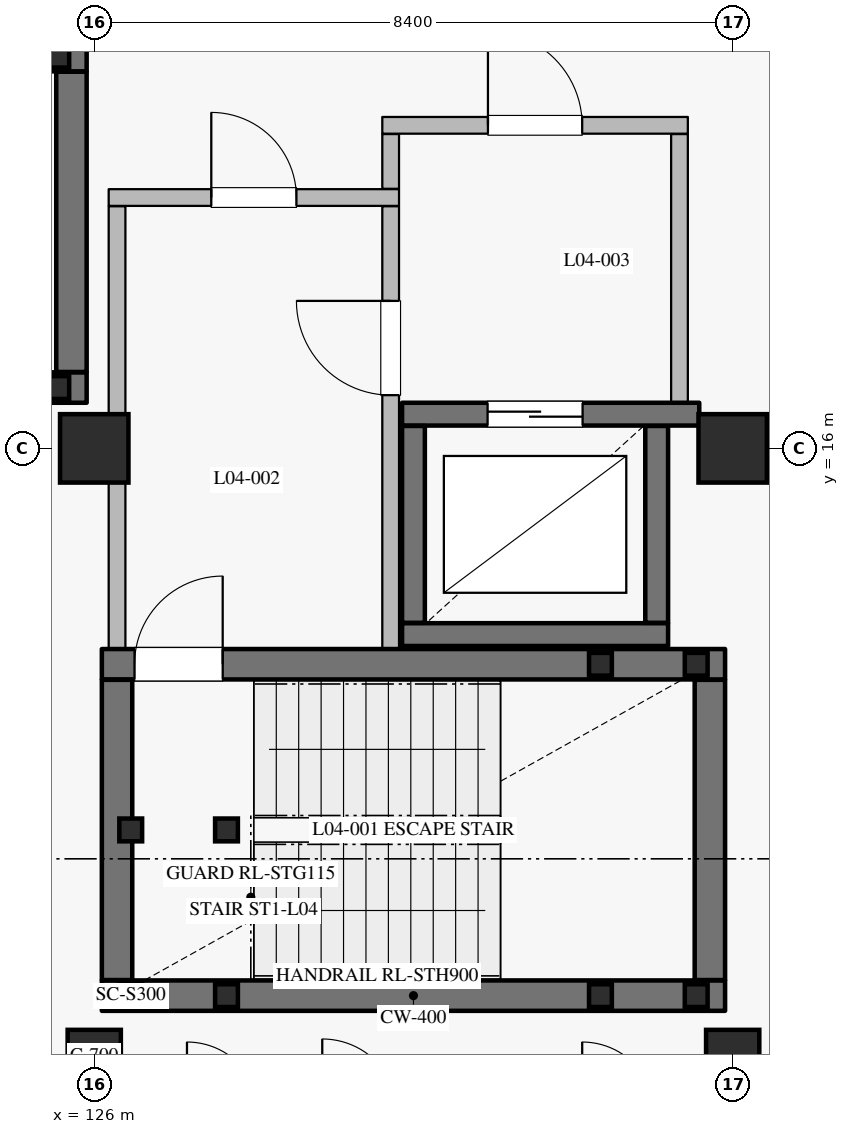
"""IFC4 building model, lengths in metres.
Left out: names, types, materials, properties, quantities, classifications, styles, units other than length and angle.
Written with IfcOpenShell. Run it as: python <this file> out.ifc"""

import sys

from ifc_helpers import new_model, si_unit, direction, frame, frame_2d, origin, origin_2d, place, context, subcontext, project, spatial, rectangle, hollow_rectangle, extrude, element, fill, save


model = new_model("IFC4")
c1 = context("Model", 3, precision=1e-05, world=origin(), true_north=direction((0.0, 1.0)))
c2 = subcontext(c1, "Body", "Model", "MODEL_VIEW")
j1 = project(units=[si_unit("LENGTHUNIT", "METRE"), si_unit("PLANEANGLEUNIT", "RADIAN")], contexts=[c1])
p1 = place(None, origin())
s1 = spatial("IfcSite", under=j1, at=p1, CompositionType="ELEMENT")
p2 = place(p1, origin())
s2 = spatial("IfcBuilding", under=s1, at=p2, CompositionType="ELEMENT")
p3 = place(p2, frame((0.0, 0.0, 21.0)))
s3 = spatial("IfcBuildingStorey", under=s2, at=p3, CompositionType="ELEMENT", Elevation=21.0)
for number, where, z_axis, x_axis in (
    (1, (126.0, 16.0, 0.0), (0.0, 0.0, 1.0), (1.0, 0.0, 0.0)),
    (2, (134.4, 16.0, 0.0), (0.0, 0.0, 1.0), (1.0, 0.0, 0.0)),
):
    element("IfcColumn", number, at=place(p3, frame(where, z_axis=z_axis, x_axis=x_axis)), inside=s3, PredefinedType="COLUMN", context=c2, shape_type="SweptSolid", body=[
        extrude(rectangle(XDim=0.9, YDim=0.9, at=origin_2d()), origin(), (0.0, 0.0, 1.0), 4.2),
    ])
for number, where, z_axis, x_axis in (
    (3, (126.0, 8.0, 0.0), (0.0, 0.0, 1.0), (1.0, 0.0, 0.0)),
    (4, (134.4, 8.0, 0.0), (0.0, 0.0, 1.0), (1.0, 0.0, 0.0)),
):
    element("IfcColumn", number, at=place(p3, frame(where, z_axis=z_axis, x_axis=x_axis)), inside=s3, PredefinedType="COLUMN", context=c2, shape_type="SweptSolid", body=[
        extrude(rectangle(XDim=0.7, YDim=0.7, at=origin_2d()), origin(), (0.0, 0.0, 1.0), 4.2),
    ])
p4 = place(p3, frame((130.05, 13.55, 0.0), z_axis=(0.0, 0.0, 1.0), x_axis=(1.0, 0.0, 0.0)))
e5 = element("IfcWall", 5, at=p4, inside=s3, PredefinedType="SHEAR", context=c2, shape_type="SweptSolid", body=[
    extrude(rectangle(XDim=3.5, YDim=0.3, at=frame_2d((1.75, 0.0))), origin(), (0.0, 0.0, 1.0), 3.965),
])
p5 = place(p3, frame((133.4, 13.705, 0.0), z_axis=(0.0, 0.0, 1.0), x_axis=(0.0, 1.0, 0.0)))
e6 = element("IfcWall", 6, at=p5, inside=s3, PredefinedType="SHEAR", context=c2, shape_type="SweptSolid", body=[
    extrude(rectangle(XDim=2.59, YDim=0.3, at=frame_2d((1.295, 0.0))), origin(), (0.0, 0.0, 1.0), 3.965),
])
p6 = place(p3, frame((133.96, 16.45, 0.0), z_axis=(0.0, 0.0, 1.0), x_axis=(-1.0, 0.0, 0.0)))
e7 = element("IfcWall", 7, at=p6, inside=s3, PredefinedType="SHEAR", context=c2, shape_type="SweptSolid", body=[
    extrude(rectangle(XDim=3.91, YDim=0.3, at=frame_2d((1.955, 0.0))), origin(), (0.0, 0.0, 1.0), 3.965),
])
p7 = place(p6, frame((1.535, 0.0, 0.0)))
e8 = element("IfcOpeningElement", 8, at=p7, cuts=e7, PredefinedType="OPENING", context=c2, shape_type="SweptSolid", body=[
    extrude(rectangle(XDim=1.25, YDim=2.25, at=frame_2d((0.625, 1.125))), frame((0.0, 0.16, 0.0), z_axis=(0.0, -1.0, 0.0), x_axis=(1.0, 0.0, 0.0)), (0.0, 0.0, 1.0), 0.32),
])
p8 = place(p3, frame((130.2, 16.295, 0.0), z_axis=(0.0, 0.0, 1.0), x_axis=(0.0, -1.0, 0.0)))
e9 = element("IfcWall", 9, at=p8, inside=s3, PredefinedType="SHEAR", context=c2, shape_type="SweptSolid", body=[
    extrude(rectangle(XDim=2.59, YDim=0.3, at=frame_2d((1.295, 0.0))), origin(), (0.0, 0.0, 1.0), 3.965),
])
p9 = place(p3, frame((126.1, 8.8, 0.0), z_axis=(0.0, 0.0, 1.0), x_axis=(1.0, 0.0, 0.0)))
e10 = element("IfcWall", 10, at=p9, inside=s3, PredefinedType="SHEAR", context=c2, shape_type="SweptSolid", body=[
    extrude(rectangle(XDim=8.2, YDim=0.4, at=frame_2d((4.1, 0.0))), origin(), (0.0, 0.0, 1.0), 3.965),
])
p10 = place(p3, frame((134.1, 9.005, 0.0), z_axis=(0.0, 0.0, 1.0), x_axis=(0.0, 1.0, 0.0)))
e11 = element("IfcWall", 11, at=p10, inside=s3, PredefinedType="SHEAR", context=c2, shape_type="SweptSolid", body=[
    extrude(rectangle(XDim=3.95, YDim=0.4, at=frame_2d((1.975, 0.0))), origin(), (0.0, 0.0, 1.0), 3.965),
])
p11 = place(p3, frame((126.1, 13.16, 0.0), z_axis=(0.0, 0.0, 1.0), x_axis=(1.0, 0.0, 0.0)))
e12 = element("IfcWall", 12, at=p11, inside=s3, PredefinedType="SHEAR", context=c2, shape_type="SweptSolid", body=[
    extrude(rectangle(XDim=8.2, YDim=0.4, at=frame_2d((4.1, 0.0))), origin(), (0.0, 0.0, 1.0), 3.965),
])
p12 = place(p11, frame((0.43, 0.0, 0.0)))
e13 = element("IfcOpeningElement", 13, at=p12, cuts=e12, PredefinedType="OPENING", context=c2, shape_type="SweptSolid", body=[
    extrude(rectangle(XDim=1.16, YDim=2.2, at=frame_2d((0.58, 1.1))), frame((0.0, 0.21, 0.0), z_axis=(0.0, -1.0, 0.0), x_axis=(1.0, 0.0, 0.0)), (0.0, 0.0, 1.0), 0.42),
])
p13 = place(p3, frame((126.3, 9.005, 0.0), z_axis=(0.0, 0.0, 1.0), x_axis=(0.0, 1.0, 0.0)))
e14 = element("IfcWall", 14, at=p13, inside=s3, PredefinedType="SHEAR", context=c2, shape_type="SweptSolid", body=[
    extrude(rectangle(XDim=3.95, YDim=0.4, at=frame_2d((1.975, 0.0))), origin(), (0.0, 0.0, 1.0), 3.965),
])
p14 = place(p3, frame((126.3, 13.365, 0.0), z_axis=(0.0, 0.0, 1.0), x_axis=(0.0, 1.0, 0.0)))
e15 = element("IfcWall", 15, at=p14, inside=s3, PredefinedType="PARTITIONING", context=c2, shape_type="SweptSolid", body=[
    extrude(rectangle(XDim=5.82, YDim=0.22, at=frame_2d((2.91, 0.0))), origin(), (0.0, 0.0, 1.0), 3.965),
])
p15 = place(p3, frame((126.19, 19.3, 0.0), z_axis=(0.0, 0.0, 1.0), x_axis=(1.0, 0.0, 0.0)))
e16 = element("IfcWall", 16, at=p15, inside=s3, PredefinedType="PARTITIONING", context=c2, shape_type="SweptSolid", body=[
    extrude(rectangle(XDim=3.82, YDim=0.22, at=frame_2d((1.91, 0.0))), origin(), (0.0, 0.0, 1.0), 3.965),
])
p16 = place(p15, frame((1.35, 0.0, 0.0)))
e17 = element("IfcOpeningElement", 17, at=p16, cuts=e16, PredefinedType="OPENING", context=c2, shape_type="SweptSolid", body=[
    extrude(rectangle(XDim=1.12, YDim=2.2, at=frame_2d((0.56, 1.1))), frame((0.0, 0.12, 0.0), z_axis=(0.0, -1.0, 0.0), x_axis=(1.0, 0.0, 0.0)), (0.0, 0.0, 1.0), 0.24),
])
p17 = place(p3, frame((129.9, 13.365, 0.0), z_axis=(0.0, 0.0, 1.0), x_axis=(0.0, 1.0, 0.0)))
e18 = element("IfcWall", 18, at=p17, inside=s3, PredefinedType="PARTITIONING", context=c2, shape_type="SweptSolid", body=[
    extrude(rectangle(XDim=5.82, YDim=0.22, at=frame_2d((2.91, 0.0))), origin(), (0.0, 0.0, 1.0), 3.965),
])
p18 = place(p17, frame((3.335, 0.0, 0.0)))
e19 = element("IfcOpeningElement", 19, at=p18, cuts=e18, PredefinedType="OPENING", context=c2, shape_type="SweptSolid", body=[
    extrude(rectangle(XDim=1.24, YDim=2.2, at=frame_2d((0.62, 1.1))), frame((0.0, 0.12, 0.0), z_axis=(0.0, -1.0, 0.0), x_axis=(1.0, 0.0, 0.0)), (0.0, 0.0, 1.0), 0.24),
])
p19 = place(p3, frame((129.9, 19.415, 0.0), z_axis=(0.0, 0.0, 1.0), x_axis=(0.0, 1.0, 0.0)))
e20 = element("IfcWall", 20, at=p19, inside=s3, PredefinedType="PARTITIONING", context=c2, shape_type="SweptSolid", body=[
    extrude(rectangle(XDim=0.72, YDim=0.22, at=frame_2d((0.36, 0.0))), origin(), (0.0, 0.0, 1.0), 3.965),
])
p20 = place(p3, frame((133.7, 16.605, 0.0), z_axis=(0.0, 0.0, 1.0), x_axis=(0.0, 1.0, 0.0)))
e21 = element("IfcWall", 21, at=p20, inside=s3, PredefinedType="PARTITIONING", context=c2, shape_type="SweptSolid", body=[
    extrude(rectangle(XDim=3.53, YDim=0.22, at=frame_2d((1.765, 0.0))), origin(), (0.0, 0.0, 1.0), 3.965),
])
p21 = place(p3, frame((129.79, 20.25, 0.0), z_axis=(0.0, 0.0, 1.0), x_axis=(1.0, 0.0, 0.0)))
e22 = element("IfcWall", 22, at=p21, inside=s3, PredefinedType="PARTITIONING", context=c2, shape_type="SweptSolid", body=[
    extrude(rectangle(XDim=4.02, YDim=0.22, at=frame_2d((2.01, 0.0))), origin(), (0.0, 0.0, 1.0), 3.965),
])
p22 = place(p21, frame((1.39, 0.0, 0.0)))
e23 = element("IfcOpeningElement", 23, at=p22, cuts=e22, PredefinedType="OPENING", context=c2, shape_type="SweptSolid", body=[
    extrude(rectangle(XDim=1.24, YDim=2.2, at=frame_2d((0.62, 1.1))), frame((0.0, 0.12, 0.0), z_axis=(0.0, -1.0, 0.0), x_axis=(1.0, 0.0, 0.0)), (0.0, 0.0, 1.0), 0.24),
])
for number, where, z_axis, x_axis in (
    (24, (126.48, 8.8, 0.0), (0.0, 0.0, 1.0), (1.0, 0.0, 0.0)),
    (25, (126.48, 10.98, 0.0), (0.0, 0.0, 1.0), (1.0, 0.0, 0.0)),
    (26, (127.74, 8.8, 0.0), (0.0, 0.0, 1.0), (1.0, 0.0, 0.0)),
    (27, (127.74, 10.98, 0.0), (0.0, 0.0, 1.0), (1.0, 0.0, 0.0)),
):
    element("IfcColumn", number, at=place(p3, frame(where, z_axis=z_axis, x_axis=x_axis)), inside=s3, PredefinedType="COLUMN", context=c2, shape_type="SweptSolid", body=[
        extrude(hollow_rectangle(XDim=0.3, YDim=0.3, WallThickness=0.012, at=origin_2d()), origin(), (0.0, 0.0, 1.0), 4.02),
    ])
for number, where, z_axis, x_axis in (
    (28, (132.66, 8.8, -2.4), (0.0, 0.0, 1.0), (1.0, 0.0, 0.0)),
    (29, (132.66, 13.16, -2.4), (0.0, 0.0, 1.0), (1.0, 0.0, 0.0)),
    (30, (133.92, 8.8, -2.4), (0.0, 0.0, 1.0), (1.0, 0.0, 0.0)),
    (31, (133.92, 13.16, -2.4), (0.0, 0.0, 1.0), (1.0, 0.0, 0.0)),
):
    element("IfcColumn", number, at=place(p3, frame(where, z_axis=z_axis, x_axis=x_axis)), inside=s3, PredefinedType="COLUMN", context=c2, shape_type="SweptSolid", body=[
        extrude(hollow_rectangle(XDim=0.3, YDim=0.3, WallThickness=0.012, at=origin_2d()), origin(), (0.0, 0.0, 1.0), 4.32),
    ])
p23 = place(p3, frame((117.75, 16.8, 0.0), z_axis=(0.0, 0.0, 1.0), x_axis=(1.0, 0.0, 0.0)))
e32 = element("IfcWall", 32, at=p23, inside=s3, PredefinedType="SHEAR", context=c2, shape_type="SweptSolid", body=[
    extrude(rectangle(XDim=8.15, YDim=0.4, at=frame_2d((4.075, 0.0))), origin(), (0.0, 0.0, 1.0), 3.965),
])
p24 = place(p3, frame((125.7, 17.005, 0.0), z_axis=(0.0, 0.0, 1.0), x_axis=(0.0, 1.0, 0.0)))
e33 = element("IfcWall", 33, at=p24, inside=s3, PredefinedType="SHEAR", context=c2, shape_type="SweptSolid", body=[
    extrude(rectangle(XDim=3.95, YDim=0.4, at=frame_2d((1.975, 0.0))), origin(), (0.0, 0.0, 1.0), 3.965),
])
p25 = place(p3, frame((117.75, 21.16, 0.0), z_axis=(0.0, 0.0, 1.0), x_axis=(1.0, 0.0, 0.0)))
e34 = element("IfcWall", 34, at=p25, inside=s3, PredefinedType="SHEAR", context=c2, shape_type="SweptSolid", body=[
    extrude(rectangle(XDim=8.15, YDim=0.4, at=frame_2d((4.075, 0.0))), origin(), (0.0, 0.0, 1.0), 3.965),
])
p26 = place(p25, frame((0.38, 0.0, 0.0)))
e35 = element("IfcOpeningElement", 35, at=p26, cuts=e34, PredefinedType="OPENING", context=c2, shape_type="SweptSolid", body=[
    extrude(rectangle(XDim=1.16, YDim=2.2, at=frame_2d((0.58, 1.1))), frame((0.0, 0.21, 0.0), z_axis=(0.0, -1.0, 0.0), x_axis=(1.0, 0.0, 0.0)), (0.0, 0.0, 1.0), 0.42),
])
for number, where, z_axis, x_axis in (
    (36, (125.52, 16.8, -2.4), (0.0, 0.0, 1.0), (1.0, 0.0, 0.0)),
    (37, (125.52, 21.16, -2.4), (0.0, 0.0, 1.0), (1.0, 0.0, 0.0)),
):
    element("IfcColumn", number, at=place(p3, frame(where, z_axis=z_axis, x_axis=x_axis)), inside=s3, PredefinedType="COLUMN", context=c2, shape_type="SweptSolid", body=[
        extrude(hollow_rectangle(XDim=0.3, YDim=0.3, WallThickness=0.012, at=origin_2d()), origin(), (0.0, 0.0, 1.0), 4.32),
    ])
p27 = place(p7, origin())
e38 = element("IfcDoor", 38, at=p27, inside=s3, OperationType="DOUBLE_DOOR_SLIDING", PredefinedType="DOOR", context=c2, shape_type="SweptSolid", body=[
    extrude(rectangle(XDim=1.25, YDim=2.25, at=frame_2d((0.625, 1.125))), frame((0.0, 0.025, 0.0), z_axis=(0.0, -1.0, 0.0), x_axis=(1.0, 0.0, 0.0)), (0.0, 0.0, 1.0), 0.05),
])
fill(e8, e38)
p28 = place(p12, origin())
e39 = element("IfcDoor", 39, at=p28, inside=s3, OperationType="SINGLE_SWING_RIGHT", PredefinedType="DOOR", context=c2, shape_type="SweptSolid", body=[
    extrude(rectangle(XDim=1.16, YDim=2.2, at=frame_2d((0.58, 1.1))), frame((0.0, 0.025, 0.0), z_axis=(0.0, -1.0, 0.0), x_axis=(1.0, 0.0, 0.0)), (0.0, 0.0, 1.0), 0.05),
])
fill(e13, e39)
p29 = place(p16, origin())
e40 = element("IfcDoor", 40, at=p29, inside=s3, OperationType="SINGLE_SWING_LEFT", PredefinedType="DOOR", context=c2, shape_type="SweptSolid", body=[
    extrude(rectangle(XDim=1.12, YDim=2.2, at=frame_2d((0.56, 1.1))), frame((0.0, 0.025, 0.0), z_axis=(0.0, -1.0, 0.0), x_axis=(1.0, 0.0, 0.0)), (0.0, 0.0, 1.0), 0.05),
])
fill(e17, e40)
p30 = place(p18, origin())
e41 = element("IfcDoor", 41, at=p30, inside=s3, OperationType="SINGLE_SWING_RIGHT", PredefinedType="DOOR", context=c2, shape_type="SweptSolid", body=[
    extrude(rectangle(XDim=1.24, YDim=2.2, at=frame_2d((0.62, 1.1))), frame((0.0, 0.025, 0.0), z_axis=(0.0, -1.0, 0.0), x_axis=(1.0, 0.0, 0.0)), (0.0, 0.0, 1.0), 0.05),
])
fill(e19, e41)
p31 = place(p22, origin())
e42 = element("IfcDoor", 42, at=p31, inside=s3, OperationType="SINGLE_SWING_LEFT", PredefinedType="DOOR", context=c2, shape_type="SweptSolid", body=[
    extrude(rectangle(XDim=1.24, YDim=2.2, at=frame_2d((0.62, 1.1))), frame((0.0, 0.025, 0.0), z_axis=(0.0, -1.0, 0.0), x_axis=(1.0, 0.0, 0.0)), (0.0, 0.0, 1.0), 0.05),
])
fill(e23, e42)
save(model, sys.argv[1])
